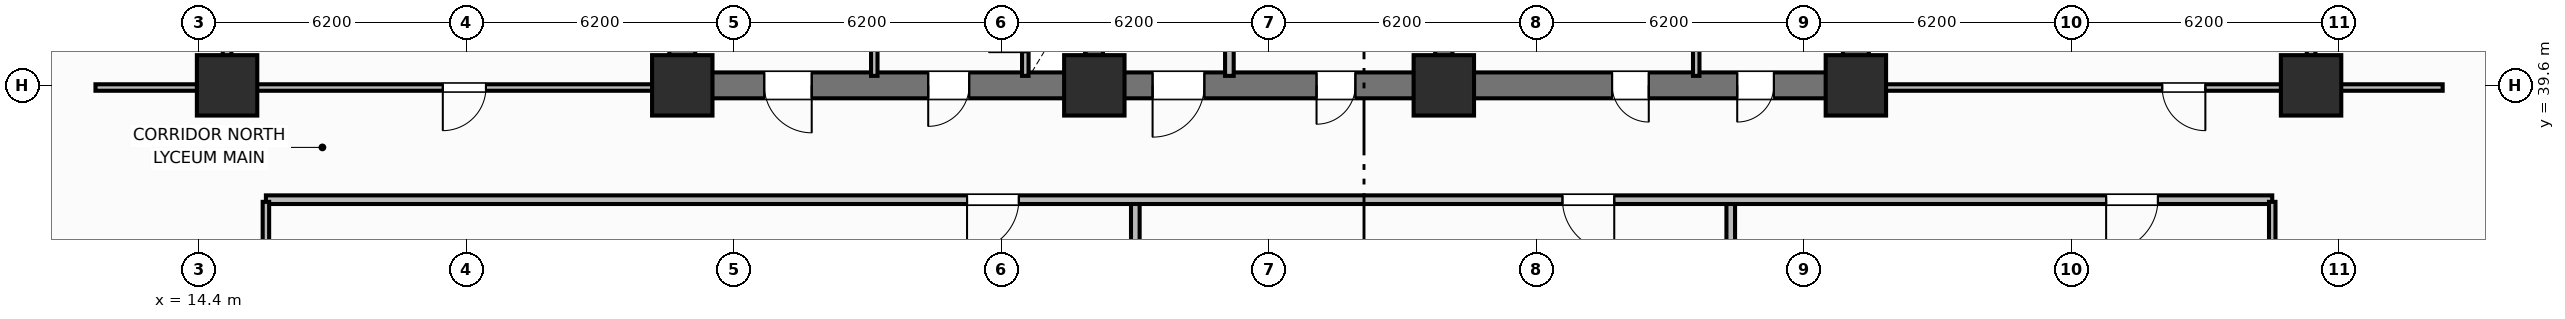
"""IFC4 building model, lengths in metres.
Left out: names, types, materials, properties, quantities, classifications, styles, units other than length and angle.
Written with IfcOpenShell. Run it as: python <this file> out.ifc"""

import sys

from ifc_helpers import new_model, si_unit, direction, frame, frame_2d, origin, origin_2d, place, context, subcontext, project, spatial, rectangle, extrude, element, fill, save


model = new_model("IFC4")
c1 = context("Model", 3, precision=1e-05, world=origin(), true_north=direction((0.0, 1.0)))
c2 = subcontext(c1, "Body", "Model", "MODEL_VIEW")
j1 = project(units=[si_unit("LENGTHUNIT", "METRE"), si_unit("PLANEANGLEUNIT", "RADIAN")], contexts=[c1])
p1 = place(None, origin())
s1 = spatial("IfcSite", under=j1, at=p1, CompositionType="ELEMENT")
p2 = place(p1, origin())
s2 = spatial("IfcBuilding", under=s1, at=p2, CompositionType="ELEMENT")
p3 = place(p2, frame((0.0, 0.0, 6.6)))
s3 = spatial("IfcBuildingStorey", under=s2, at=p3, CompositionType="ELEMENT", Elevation=6.6)
for number, where, z_axis, x_axis in (
    (1, (25.6, 39.9, 0.0), (0.0, 0.0, 1.0), (0.0, 1.0, 0.0)),
    (2, (52.8, 39.9, 0.0), (0.0, 0.0, 1.0), (0.0, 1.0, 0.0)),
):
    element("IfcWall", number, at=place(p3, frame(where, z_axis=z_axis, x_axis=x_axis)), inside=s3, PredefinedType="SHEAR", context=c2, shape_type="SweptSolid", body=[
        extrude(rectangle(XDim=5.6, YDim=0.6, at=frame_2d((2.8, 0.0))), origin(), (0.0, 0.0, 1.0), 4.5),
    ])
p4 = place(p3, frame((52.8, 39.6, 0.0), z_axis=(0.0, 0.0, 1.0), x_axis=(-1.0, 0.0, 0.0)))
e3 = element("IfcWall", 3, at=p4, inside=s3, PredefinedType="SHEAR", context=c2, shape_type="SweptSolid", body=[
    extrude(rectangle(XDim=27.2, YDim=0.6, at=frame_2d((13.6, 0.0))), origin(), (0.0, 0.0, 1.0), 4.5),
])
p5 = place(p4, frame((24.2, 0.0, 0.0)))
e4 = element("IfcOpeningElement", 4, at=p5, cuts=e3, PredefinedType="OPENING", context=c2, shape_type="SweptSolid", body=[
    extrude(rectangle(XDim=1.1, YDim=2.15, at=frame_2d((0.55, 1.075))), frame((0.0, 0.31, 0.0), z_axis=(0.0, -1.0, 0.0), x_axis=(1.0, 0.0, 0.0)), (0.0, 0.0, 1.0), 0.62),
])
p6 = place(p4, frame((20.55, 0.0, 0.0)))
e5 = element("IfcOpeningElement", 5, at=p6, cuts=e3, PredefinedType="OPENING", context=c2, shape_type="SweptSolid", body=[
    extrude(rectangle(XDim=0.95, YDim=2.1, at=frame_2d((0.475, 1.05))), frame((0.0, 0.31, 0.0), z_axis=(0.0, -1.0, 0.0), x_axis=(1.0, 0.0, 0.0)), (0.0, 0.0, 1.0), 0.62),
])
p7 = place(p4, frame((15.1, 0.0, 0.0)))
e6 = element("IfcOpeningElement", 6, at=p7, cuts=e3, PredefinedType="OPENING", context=c2, shape_type="SweptSolid", body=[
    extrude(rectangle(XDim=1.2, YDim=2.15, at=frame_2d((0.6, 1.075))), frame((0.0, 0.31, 0.0), z_axis=(0.0, -1.0, 0.0), x_axis=(1.0, 0.0, 0.0)), (0.0, 0.0, 1.0), 0.62),
])
p8 = place(p4, frame((11.6, 0.0, 0.0)))
e7 = element("IfcOpeningElement", 7, at=p8, cuts=e3, PredefinedType="OPENING", context=c2, shape_type="SweptSolid", body=[
    extrude(rectangle(XDim=0.9, YDim=2.1, at=frame_2d((0.45, 1.05))), frame((0.0, 0.31, 0.0), z_axis=(0.0, -1.0, 0.0), x_axis=(1.0, 0.0, 0.0)), (0.0, 0.0, 1.0), 0.62),
])
p9 = place(p4, frame((4.8, 0.0, 0.0)))
e8 = element("IfcOpeningElement", 8, at=p9, cuts=e3, PredefinedType="OPENING", context=c2, shape_type="SweptSolid", body=[
    extrude(rectangle(XDim=0.85, YDim=2.1, at=frame_2d((0.425, 1.05))), frame((0.0, 0.31, 0.0), z_axis=(0.0, -1.0, 0.0), x_axis=(1.0, 0.0, 0.0)), (0.0, 0.0, 1.0), 0.62),
])
p10 = place(p4, frame((1.9, 0.0, 0.0)))
e9 = element("IfcOpeningElement", 9, at=p10, cuts=e3, PredefinedType="OPENING", context=c2, shape_type="SweptSolid", body=[
    extrude(rectangle(XDim=0.85, YDim=2.1, at=frame_2d((0.425, 1.05))), frame((0.0, 0.31, 0.0), z_axis=(0.0, -1.0, 0.0), x_axis=(1.0, 0.0, 0.0)), (0.0, 0.0, 1.0), 0.62),
])
for number, where, z_axis, x_axis in (
    (10, (35.15, 39.9, 0.0), (0.0, 0.0, 1.0), (0.0, 1.0, 0.0)),
    (11, (43.25, 39.9, 0.0), (0.0, 0.0, 1.0), (0.0, 1.0, 0.0)),
):
    element("IfcWall", number, at=place(p3, frame(where, z_axis=z_axis, x_axis=x_axis)), inside=s3, PredefinedType="SHEAR", context=c2, shape_type="SweptSolid", body=[
        extrude(rectangle(XDim=5.6, YDim=0.4, at=frame_2d((2.8, 0.0))), origin(), (0.0, 0.0, 1.0), 4.5),
    ])
for number, where, z_axis, x_axis in (
    (12, (25.6, 39.6, 0.0), (0.0, 0.0, 1.0), (1.0, 0.0, 0.0)),
    (13, (35.15, 39.6, 0.0), (0.0, 0.0, 1.0), (1.0, 0.0, 0.0)),
    (14, (43.25, 39.6, 0.0), (0.0, 0.0, 1.0), (1.0, 0.0, 0.0)),
    (15, (52.8, 39.6, 0.0), (0.0, 0.0, 1.0), (1.0, 0.0, 0.0)),
    (16, (15.05, 39.6, 0.0), (0.0, 0.0, 1.0), (1.0, 0.0, 0.0)),
    (17, (63.35, 39.6, 0.0), (0.0, 0.0, 1.0), (1.0, 0.0, 0.0)),
):
    element("IfcColumn", number, at=place(p3, frame(where, z_axis=z_axis, x_axis=x_axis)), inside=s3, PredefinedType="COLUMN", context=c2, shape_type="SweptSolid", body=[
        extrude(rectangle(XDim=1.4, YDim=1.4, at=origin_2d()), origin(), (0.0, 0.0, 1.0), 4.5),
    ])
p11 = place(p3, frame((33.55, 39.82, 0.0), z_axis=(0.0, 0.0, 1.0), x_axis=(0.0, 1.0, 0.0)))
e18 = element("IfcWall", 18, at=p11, inside=s3, PredefinedType="PARTITIONING", context=c2, shape_type="SweptSolid", body=[
    extrude(rectangle(XDim=2.13, YDim=0.15, at=frame_2d((1.065, 0.0))), origin(), (0.0, 0.0, 1.0), 3.42),
])
p12 = place(p11, frame((0.55, 0.0, 0.0)))
e19 = element("IfcOpeningElement", 19, at=p12, cuts=e18, PredefinedType="OPENING", context=c2, shape_type="SweptSolid", body=[
    extrude(rectangle(XDim=0.85, YDim=2.05, at=frame_2d((0.425, 1.025))), frame((0.0, 0.085, 0.0), z_axis=(0.0, -1.0, 0.0), x_axis=(1.0, 0.0, 0.0)), (0.0, 0.0, 1.0), 0.17),
])
p13 = place(p3, frame((30.05, 39.82, 0.0), z_axis=(0.0, 0.0, 1.0), x_axis=(0.0, 1.0, 0.0)))
e20 = element("IfcWall", 20, at=p13, inside=s3, PredefinedType="PARTITIONING", context=c2, shape_type="SweptSolid", body=[
    extrude(rectangle(XDim=2.13, YDim=0.15, at=frame_2d((1.065, 0.0))), origin(), (0.0, 0.0, 1.0), 3.42),
])
p14 = place(p3, frame((38.28, 39.82, 0.0), z_axis=(0.0, 0.0, 1.0), x_axis=(0.0, 1.0, 0.0)))
e21 = element("IfcWall", 21, at=p14, inside=s3, PredefinedType="PARTITIONING", context=c2, shape_type="SweptSolid", body=[
    extrude(rectangle(XDim=2.73, YDim=0.2, at=frame_2d((1.365, 0.0))), origin(), (0.0, 0.0, 1.0), 3.42),
])
p15 = place(p3, frame((49.1, 39.82, 0.0), z_axis=(0.0, 0.0, 1.0), x_axis=(0.0, 1.0, 0.0)))
e22 = element("IfcWall", 22, at=p15, inside=s3, PredefinedType="PARTITIONING", context=c2, shape_type="SweptSolid", body=[
    extrude(rectangle(XDim=2.73, YDim=0.15, at=frame_2d((1.365, 0.0))), origin(), (0.0, 0.0, 1.0), 3.42),
])
for number, where, z_axis, x_axis in (
    (23, (36.1, 19.5, 0.0), (0.0, 0.0, 1.0), (0.0, 1.0, 0.0)),
    (24, (49.9, 19.5, 0.0), (0.0, 0.0, 1.0), (0.0, 1.0, 0.0)),
):
    element("IfcWall", number, at=place(p3, frame(where, z_axis=z_axis, x_axis=x_axis)), inside=s3, PredefinedType="PARTITIONING", context=c2, shape_type="SweptSolid", body=[
        extrude(rectangle(XDim=17.4, YDim=0.2, at=frame_2d((8.7, 0.0))), origin(), (0.0, 0.0, 1.0), 3.42),
    ])
p16 = place(p3, frame((62.45, 36.95, 0.0), z_axis=(0.0, 0.0, 1.0), x_axis=(-1.0, 0.0, 0.0)))
e25 = element("IfcWall", 25, at=p16, inside=s3, PredefinedType="PARTITIONING", context=c2, shape_type="SweptSolid", body=[
    extrude(rectangle(XDim=46.5, YDim=0.2, at=frame_2d((23.25, 0.0))), origin(), (0.0, 0.0, 1.0), 3.42),
])
p17 = place(p16, frame((29.05, 0.0, 0.0)))
e26 = element("IfcOpeningElement", 26, at=p17, cuts=e25, PredefinedType="OPENING", context=c2, shape_type="SweptSolid", body=[
    extrude(rectangle(XDim=1.2, YDim=2.15, at=frame_2d((0.6, 1.075))), frame((0.0, 0.11, 0.0), z_axis=(0.0, -1.0, 0.0), x_axis=(1.0, 0.0, 0.0)), (0.0, 0.0, 1.0), 0.22),
])
p18 = place(p16, frame((15.25, 0.0, 0.0)))
e27 = element("IfcOpeningElement", 27, at=p18, cuts=e25, PredefinedType="OPENING", context=c2, shape_type="SweptSolid", body=[
    extrude(rectangle(XDim=1.2, YDim=2.15, at=frame_2d((0.6, 1.075))), frame((0.0, 0.11, 0.0), z_axis=(0.0, -1.0, 0.0), x_axis=(1.0, 0.0, 0.0)), (0.0, 0.0, 1.0), 0.22),
])
p19 = place(p16, frame((2.65, 0.0, 0.0)))
e28 = element("IfcOpeningElement", 28, at=p19, cuts=e25, PredefinedType="OPENING", context=c2, shape_type="SweptSolid", body=[
    extrude(rectangle(XDim=1.2, YDim=2.15, at=frame_2d((0.6, 1.075))), frame((0.0, 0.11, 0.0), z_axis=(0.0, -1.0, 0.0), x_axis=(1.0, 0.0, 0.0)), (0.0, 0.0, 1.0), 0.22),
])
for number, where, z_axis, x_axis in (
    (29, (15.95, 19.5, 0.0), (0.0, 0.0, 1.0), (0.0, 1.0, 0.0)),
    (30, (62.45, 19.5, 0.0), (0.0, 0.0, 1.0), (0.0, 1.0, 0.0)),
):
    element("IfcWall", number, at=place(p3, frame(where, z_axis=z_axis, x_axis=x_axis)), inside=s3, PredefinedType="PARTITIONING", context=c2, shape_type="SweptSolid", body=[
        extrude(rectangle(XDim=17.4, YDim=0.15, at=frame_2d((8.7, 0.0))), origin(), (0.0, 0.0, 1.0), 3.42),
    ])
p20 = place(p3, frame((15.05, 39.6, 0.0), z_axis=(0.0, 0.0, 1.0), x_axis=(0.0, 1.0, 0.0)))
e31 = element("IfcWall", 31, at=p20, inside=s3, PredefinedType="PARTITIONING", context=c2, shape_type="SweptSolid", body=[
    extrude(rectangle(XDim=16.4, YDim=0.2, at=frame_2d((8.2, 0.0))), origin(), (0.0, 0.0, 1.0), 3.42),
])
p21 = place(p20, frame((3.4, 0.0, 0.0)))
e32 = element("IfcOpeningElement", 32, at=p21, cuts=e31, PredefinedType="OPENING", context=c2, shape_type="SweptSolid", body=[
    extrude(rectangle(XDim=1.0, YDim=2.15, at=frame_2d((0.5, 1.075))), frame((0.0, 0.11, 0.0), z_axis=(0.0, -1.0, 0.0), x_axis=(1.0, 0.0, 0.0)), (0.0, 0.0, 1.0), 0.22),
])
p22 = place(p3, frame((25.25, 39.55, 0.0), z_axis=(0.0, 0.0, 1.0), x_axis=(-1.0, 0.0, 0.0)))
e33 = element("IfcWall", 33, at=p22, inside=s3, PredefinedType="PARTITIONING", context=c2, shape_type="SweptSolid", body=[
    extrude(rectangle(XDim=13.25, YDim=0.15, at=frame_2d((6.625, 0.0))), origin(), (0.0, 0.0, 1.0), 3.42),
])
p23 = place(p22, frame((4.2, 0.0, 0.0)))
e34 = element("IfcOpeningElement", 34, at=p23, cuts=e33, PredefinedType="OPENING", context=c2, shape_type="SweptSolid", body=[
    extrude(rectangle(XDim=1.0, YDim=2.15, at=frame_2d((0.5, 1.075))), frame((0.0, 0.085, 0.0), z_axis=(0.0, -1.0, 0.0), x_axis=(1.0, 0.0, 0.0)), (0.0, 0.0, 1.0), 0.17),
])
p24 = place(p3, frame((63.35, 39.6, 0.0), z_axis=(0.0, 0.0, 1.0), x_axis=(0.0, 1.0, 0.0)))
e35 = element("IfcWall", 35, at=p24, inside=s3, PredefinedType="PARTITIONING", context=c2, shape_type="SweptSolid", body=[
    extrude(rectangle(XDim=16.4, YDim=0.2, at=frame_2d((8.2, 0.0))), origin(), (0.0, 0.0, 1.0), 3.42),
])
p25 = place(p24, frame((3.4, 0.0, 0.0)))
e36 = element("IfcOpeningElement", 36, at=p25, cuts=e35, PredefinedType="OPENING", context=c2, shape_type="SweptSolid", body=[
    extrude(rectangle(XDim=1.0, YDim=2.15, at=frame_2d((0.5, 1.075))), frame((0.0, 0.11, 0.0), z_axis=(0.0, -1.0, 0.0), x_axis=(1.0, 0.0, 0.0)), (0.0, 0.0, 1.0), 0.22),
])
p26 = place(p3, frame((66.4, 39.55, 0.0), z_axis=(0.0, 0.0, 1.0), x_axis=(-1.0, 0.0, 0.0)))
e37 = element("IfcWall", 37, at=p26, inside=s3, PredefinedType="PARTITIONING", context=c2, shape_type="SweptSolid", body=[
    extrude(rectangle(XDim=13.25, YDim=0.15, at=frame_2d((6.625, 0.0))), origin(), (0.0, 0.0, 1.0), 3.42),
])
p27 = place(p26, frame((5.5, 0.0, 0.0)))
e38 = element("IfcOpeningElement", 38, at=p27, cuts=e37, PredefinedType="OPENING", context=c2, shape_type="SweptSolid", body=[
    extrude(rectangle(XDim=1.0, YDim=2.15, at=frame_2d((0.5, 1.075))), frame((0.0, 0.085, 0.0), z_axis=(0.0, -1.0, 0.0), x_axis=(1.0, 0.0, 0.0)), (0.0, 0.0, 1.0), 0.17),
])
p28 = place(p12, origin())
e39 = element("IfcDoor", 39, at=p28, inside=s3, OperationType="SINGLE_SWING_LEFT", PredefinedType="TRAPDOOR", context=c2, shape_type="SweptSolid", body=[
    extrude(rectangle(XDim=0.85, YDim=2.05, at=frame_2d((0.425, 1.025))), frame((0.0, 0.025, 0.0), z_axis=(0.0, -1.0, 0.0), x_axis=(1.0, 0.0, 0.0)), (0.0, 0.0, 1.0), 0.05),
])
fill(e19, e39)
p29 = place(p17, origin())
e40 = element("IfcDoor", 40, at=p29, inside=s3, OperationType="SINGLE_SWING_RIGHT", PredefinedType="DOOR", context=c2, shape_type="SweptSolid", body=[
    extrude(rectangle(XDim=1.2, YDim=2.15, at=frame_2d((0.6, 1.075))), frame((0.0, 0.025, 0.0), z_axis=(0.0, -1.0, 0.0), x_axis=(1.0, 0.0, 0.0)), (0.0, 0.0, 1.0), 0.05),
])
fill(e26, e40)
p30 = place(p18, origin())
e41 = element("IfcDoor", 41, at=p30, inside=s3, OperationType="SINGLE_SWING_LEFT", PredefinedType="DOOR", context=c2, shape_type="SweptSolid", body=[
    extrude(rectangle(XDim=1.2, YDim=2.15, at=frame_2d((0.6, 1.075))), frame((0.0, 0.025, 0.0), z_axis=(0.0, -1.0, 0.0), x_axis=(1.0, 0.0, 0.0)), (0.0, 0.0, 1.0), 0.05),
])
fill(e27, e41)
p31 = place(p19, origin())
e42 = element("IfcDoor", 42, at=p31, inside=s3, OperationType="SINGLE_SWING_RIGHT", PredefinedType="DOOR", context=c2, shape_type="SweptSolid", body=[
    extrude(rectangle(XDim=1.2, YDim=2.15, at=frame_2d((0.6, 1.075))), frame((0.0, 0.025, 0.0), z_axis=(0.0, -1.0, 0.0), x_axis=(1.0, 0.0, 0.0)), (0.0, 0.0, 1.0), 0.05),
])
fill(e28, e42)
p32 = place(p23, origin())
e43 = element("IfcDoor", 43, at=p32, inside=s3, OperationType="SINGLE_SWING_RIGHT", PredefinedType="DOOR", context=c2, shape_type="SweptSolid", body=[
    extrude(rectangle(XDim=1.0, YDim=2.15, at=frame_2d((0.5, 1.075))), frame((0.0, 0.025, 0.0), z_axis=(0.0, -1.0, 0.0), x_axis=(1.0, 0.0, 0.0)), (0.0, 0.0, 1.0), 0.05),
])
fill(e34, e43)
p33 = place(p27, origin())
e44 = element("IfcDoor", 44, at=p33, inside=s3, OperationType="SINGLE_SWING_LEFT", PredefinedType="DOOR", context=c2, shape_type="SweptSolid", body=[
    extrude(rectangle(XDim=1.0, YDim=2.15, at=frame_2d((0.5, 1.075))), frame((0.0, 0.025, 0.0), z_axis=(0.0, -1.0, 0.0), x_axis=(1.0, 0.0, 0.0)), (0.0, 0.0, 1.0), 0.05),
])
fill(e38, e44)
p34 = place(p5, origin())
e45 = element("IfcDoor", 45, at=p34, inside=s3, OperationType="SINGLE_SWING_LEFT", PredefinedType="DOOR", context=c2, shape_type="SweptSolid", body=[
    extrude(rectangle(XDim=1.1, YDim=2.15, at=frame_2d((0.55, 1.075))), frame((0.0, 0.025, 0.0), z_axis=(0.0, -1.0, 0.0), x_axis=(1.0, 0.0, 0.0)), (0.0, 0.0, 1.0), 0.05),
])
fill(e4, e45)
p35 = place(p6, origin())
e46 = element("IfcDoor", 46, at=p35, inside=s3, OperationType="SINGLE_SWING_RIGHT", PredefinedType="DOOR", context=c2, shape_type="SweptSolid", body=[
    extrude(rectangle(XDim=0.95, YDim=2.1, at=frame_2d((0.475, 1.05))), frame((0.0, 0.025, 0.0), z_axis=(0.0, -1.0, 0.0), x_axis=(1.0, 0.0, 0.0)), (0.0, 0.0, 1.0), 0.05),
])
fill(e5, e46)
p36 = place(p7, origin())
e47 = element("IfcDoor", 47, at=p36, inside=s3, OperationType="SINGLE_SWING_RIGHT", PredefinedType="DOOR", context=c2, shape_type="SweptSolid", body=[
    extrude(rectangle(XDim=1.2, YDim=2.15, at=frame_2d((0.6, 1.075))), frame((0.0, 0.025, 0.0), z_axis=(0.0, -1.0, 0.0), x_axis=(1.0, 0.0, 0.0)), (0.0, 0.0, 1.0), 0.05),
])
fill(e6, e47)
p37 = place(p8, origin())
e48 = element("IfcDoor", 48, at=p37, inside=s3, OperationType="SINGLE_SWING_RIGHT", PredefinedType="DOOR", context=c2, shape_type="SweptSolid", body=[
    extrude(rectangle(XDim=0.9, YDim=2.1, at=frame_2d((0.45, 1.05))), frame((0.0, 0.025, 0.0), z_axis=(0.0, -1.0, 0.0), x_axis=(1.0, 0.0, 0.0)), (0.0, 0.0, 1.0), 0.05),
])
fill(e7, e48)
p38 = place(p9, origin())
e49 = element("IfcDoor", 49, at=p38, inside=s3, OperationType="SINGLE_SWING_LEFT", PredefinedType="DOOR", context=c2, shape_type="SweptSolid", body=[
    extrude(rectangle(XDim=0.85, YDim=2.1, at=frame_2d((0.425, 1.05))), frame((0.0, 0.025, 0.0), z_axis=(0.0, -1.0, 0.0), x_axis=(1.0, 0.0, 0.0)), (0.0, 0.0, 1.0), 0.05),
])
fill(e8, e49)
p39 = place(p10, origin())
e50 = element("IfcDoor", 50, at=p39, inside=s3, OperationType="SINGLE_SWING_RIGHT", PredefinedType="DOOR", context=c2, shape_type="SweptSolid", body=[
    extrude(rectangle(XDim=0.85, YDim=2.1, at=frame_2d((0.425, 1.05))), frame((0.0, 0.025, 0.0), z_axis=(0.0, -1.0, 0.0), x_axis=(1.0, 0.0, 0.0)), (0.0, 0.0, 1.0), 0.05),
])
fill(e9, e50)
save(model, sys.argv[1])
